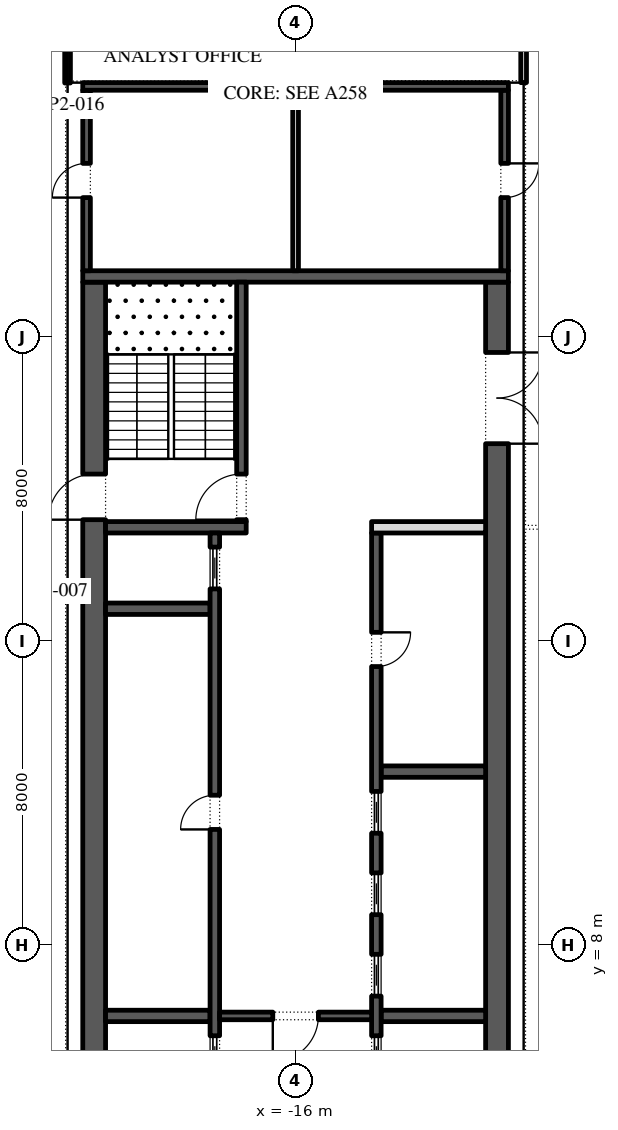
"""IFC4 building model, lengths in metres.
Left out: names, types, materials, properties, quantities, classifications, styles, units other than length and angle.
Written with IfcOpenShell. Run it as: python <this file> out.ifc"""

import sys

from ifc_helpers import new_model, si_unit, direction, frame, frame_2d, origin, place, context, subcontext, project, spatial, rectangle, extrude, element, fill, save


model = new_model("IFC4")
c1 = context("Model", 3, precision=1e-05, world=origin(), true_north=direction((0.0, 1.0)))
c2 = subcontext(c1, "Body", "Model", "MODEL_VIEW")
j1 = project(units=[si_unit("LENGTHUNIT", "METRE"), si_unit("PLANEANGLEUNIT", "RADIAN")], contexts=[c1])
p1 = place(None, origin())
s1 = spatial("IfcSite", under=j1, at=p1, CompositionType="ELEMENT")
p2 = place(p1, origin())
s2 = spatial("IfcBuilding", under=s1, at=p2, CompositionType="ELEMENT")
p3 = place(p2, frame((0.0, 0.0, 255.6)))
s3 = spatial("IfcBuildingStorey", under=s2, at=p3, CompositionType="ELEMENT", Elevation=255.6)
p4 = place(p3, frame((-21.359, 48.678, 0.0), z_axis=(0.0, 0.0, 1.0), x_axis=(-0.224949198343, -0.974370493275, 0.0)))
e1 = element("IfcWall", 1, at=p4, inside=s3, PredefinedType="STANDARD", context=c2, shape_type="SweptSolid", body=[
    extrude(rectangle(XDim=49.5, YDim=0.3, at=frame_2d((24.75, 0.0))), origin(), (0.0, 0.0, 1.0), 4.0),
])
p5 = place(p4, frame((1.157, 0.0, 0.45)))
e2 = element("IfcOpeningElement", 2, at=p5, cuts=e1, PredefinedType="OPENING", context=c2, shape_type="SweptSolid", body=[
    extrude(rectangle(XDim=4.5, YDim=3.05, at=frame_2d((2.25, 1.525))), frame((0.0, 0.16, 0.0), z_axis=(0.0, -1.0, 0.0), x_axis=(1.0, 0.0, 0.0)), (0.0, 0.0, 1.0), 0.32),
])
p6 = place(p4, frame((9.171, 0.0, 0.0)))
e3 = element("IfcOpeningElement", 3, at=p6, cuts=e1, PredefinedType="OPENING", context=c2, shape_type="SweptSolid", body=[
    extrude(rectangle(XDim=2.4, YDim=3.5, at=frame_2d((1.2, 1.75))), frame((0.0, 0.16, 0.0), z_axis=(0.0, -1.0, 0.0), x_axis=(1.0, 0.0, 0.0)), (0.0, 0.0, 1.0), 0.32),
])
p7 = place(p4, frame((15.236, 0.0, 0.45)))
e4 = element("IfcOpeningElement", 4, at=p7, cuts=e1, PredefinedType="OPENING", context=c2, shape_type="SweptSolid", body=[
    extrude(rectangle(XDim=4.5, YDim=3.05, at=frame_2d((2.25, 1.525))), frame((0.0, 0.16, 0.0), z_axis=(0.0, -1.0, 0.0), x_axis=(1.0, 0.0, 0.0)), (0.0, 0.0, 1.0), 0.32),
])
p8 = place(p4, frame((22.35, 0.0, 0.45)))
e5 = element("IfcOpeningElement", 5, at=p8, cuts=e1, PredefinedType="OPENING", context=c2, shape_type="SweptSolid", body=[
    extrude(rectangle(XDim=4.5, YDim=3.05, at=frame_2d((2.25, 1.525))), frame((0.0, 0.16, 0.0), z_axis=(0.0, -1.0, 0.0), x_axis=(1.0, 0.0, 0.0)), (0.0, 0.0, 1.0), 0.32),
])
p9 = place(p4, frame((29.464, 0.0, 0.45)))
e6 = element("IfcOpeningElement", 6, at=p9, cuts=e1, PredefinedType="OPENING", context=c2, shape_type="SweptSolid", body=[
    extrude(rectangle(XDim=4.5, YDim=3.05, at=frame_2d((2.25, 1.525))), frame((0.0, 0.16, 0.0), z_axis=(0.0, -1.0, 0.0), x_axis=(1.0, 0.0, 0.0)), (0.0, 0.0, 1.0), 0.32),
])
p10 = place(p4, frame((37.628, 0.0, 0.0)))
e7 = element("IfcOpeningElement", 7, at=p10, cuts=e1, PredefinedType="OPENING", context=c2, shape_type="SweptSolid", body=[
    extrude(rectangle(XDim=2.4, YDim=3.325, at=frame_2d((1.2, 1.663))), frame((0.0, 0.16, 0.0), z_axis=(0.0, -1.0, 0.0), x_axis=(1.0, 0.0, 0.0)), (0.0, 0.0, 1.0), 0.32),
])
p11 = place(p4, frame((43.693, 0.0, 0.45)))
e8 = element("IfcOpeningElement", 8, at=p11, cuts=e1, PredefinedType="OPENING", context=c2, shape_type="SweptSolid", body=[
    extrude(rectangle(XDim=4.5, YDim=2.825, at=frame_2d((2.25, 1.413))), frame((0.0, 0.16, 0.0), z_axis=(0.0, -1.0, 0.0), x_axis=(1.0, 0.0, 0.0)), (0.0, 0.0, 1.0), 0.32),
])
p12 = place(p3, frame((-21.3, -2.45, 0.0), z_axis=(0.0, 0.0, 1.0), x_axis=(0.0, 1.0, 0.0)))
e9 = element("IfcWall", 9, at=p12, inside=s3, PredefinedType="SHEAR", context=c2, shape_type="SweptSolid", body=[
    extrude(rectangle(XDim=27.9, YDim=0.6, at=frame_2d((13.95, 0.0))), origin(), (0.0, 0.0, 1.0), 4.0),
])
p13 = place(p12, frame((5.05, 0.0, 0.0)))
e10 = element("IfcOpeningElement", 10, at=p13, cuts=e9, PredefinedType="OPENING", context=c2, shape_type="SweptSolid", body=[
    extrude(rectangle(XDim=1.2, YDim=2.1, at=frame_2d((0.6, 1.05))), frame((0.0, 0.31, 0.0), z_axis=(0.0, -1.0, 0.0), x_axis=(1.0, 0.0, 0.0)), (0.0, 0.0, 1.0), 0.62),
])
p14 = place(p12, frame((21.65, 0.0, 0.0)))
e11 = element("IfcOpeningElement", 11, at=p14, cuts=e9, PredefinedType="OPENING", context=c2, shape_type="SweptSolid", body=[
    extrude(rectangle(XDim=1.2, YDim=2.1, at=frame_2d((0.6, 1.05))), frame((0.0, 0.31, 0.0), z_axis=(0.0, -1.0, 0.0), x_axis=(1.0, 0.0, 0.0)), (0.0, 0.0, 1.0), 0.62),
])
p15 = place(p3, frame((-10.7, -2.45, 0.0), z_axis=(0.0, 0.0, 1.0), x_axis=(0.0, 1.0, 0.0)))
e12 = element("IfcWall", 12, at=p15, inside=s3, PredefinedType="SHEAR", context=c2, shape_type="SweptSolid", body=[
    extrude(rectangle(XDim=27.9, YDim=0.6, at=frame_2d((13.95, 0.0))), origin(), (0.0, 0.0, 1.0), 4.0),
])
p16 = place(p15, frame((23.65, 0.0, 0.0)))
e13 = element("IfcOpeningElement", 13, at=p16, cuts=e12, PredefinedType="OPENING", context=c2, shape_type="SweptSolid", body=[
    extrude(rectangle(XDim=2.4, YDim=2.1, at=frame_2d((1.2, 1.05))), frame((0.0, 0.31, 0.0), z_axis=(0.0, -1.0, 0.0), x_axis=(1.0, 0.0, 0.0)), (0.0, 0.0, 1.0), 0.62),
])
p17 = place(p15, frame((1.087, 0.0, 0.0)))
e14 = element("IfcOpeningElement", 14, at=p17, cuts=e12, PredefinedType="OPENING", context=c2, shape_type="SweptSolid", body=[
    extrude(rectangle(XDim=0.9, YDim=2.1, at=frame_2d((0.45, 1.05))), frame((0.0, 0.31, 0.0), z_axis=(0.0, -1.0, 0.0), x_axis=(1.0, 0.0, 0.0)), (0.0, 0.0, 1.0), 0.62),
])
p18 = place(p15, frame((4.262, 0.0, 0.0)))
e15 = element("IfcOpeningElement", 15, at=p18, cuts=e12, PredefinedType="OPENING", context=c2, shape_type="SweptSolid", body=[
    extrude(rectangle(XDim=1.0, YDim=2.1, at=frame_2d((0.5, 1.05))), frame((0.0, 0.31, 0.0), z_axis=(0.0, -1.0, 0.0), x_axis=(1.0, 0.0, 0.0)), (0.0, 0.0, 1.0), 0.62),
])
p19 = place(p3, frame((-21.6, 25.6, 0.0), z_axis=(0.0, 0.0, 1.0), x_axis=(1.0, 0.0, 0.0)))
e16 = element("IfcWall", 16, at=p19, inside=s3, PredefinedType="SHEAR", context=c2, shape_type="SweptSolid", body=[
    extrude(rectangle(XDim=11.2, YDim=0.3, at=frame_2d((5.6, 0.0))), origin(), (0.0, 0.0, 1.0), 4.0),
])
p20 = place(p3, frame((-21.0, 19.0, 0.0), z_axis=(0.0, 0.0, 1.0), x_axis=(1.0, 0.0, 0.0)))
e17 = element("IfcWall", 17, at=p20, inside=s3, PredefinedType="SHEAR", context=c2, shape_type="SweptSolid", body=[
    extrude(rectangle(XDim=3.7, YDim=0.3, at=frame_2d((1.85, 0.0))), origin(), (0.0, 0.0, 1.0), 4.0),
])
p21 = place(p3, frame((-17.425, 19.15, 0.0), z_axis=(0.0, 0.0, 1.0), x_axis=(0.0, 1.0, 0.0)))
e18 = element("IfcWall", 18, at=p21, inside=s3, PredefinedType="SHEAR", context=c2, shape_type="SweptSolid", body=[
    extrude(rectangle(XDim=6.3, YDim=0.25, at=frame_2d((3.15, 0.0))), origin(), (0.0, 0.0, 1.0), 4.0),
])
p22 = place(p21, frame((0.05, 0.0, 0.0)))
e19 = element("IfcOpeningElement", 19, at=p22, cuts=e18, PredefinedType="OPENING", context=c2, shape_type="SweptSolid", body=[
    extrude(rectangle(XDim=1.2, YDim=2.1, at=frame_2d((0.6, 1.05))), frame((0.0, 0.135, 0.0), z_axis=(0.0, -1.0, 0.0), x_axis=(1.0, 0.0, 0.0)), (0.0, 0.0, 1.0), 0.27),
])
for number, where, z_axis, x_axis in (
    (20, (-21.0, 6.143, 0.0), (0.0, 0.0, 1.0), (1.0, 0.0, 0.0)),
    (21, (-21.0, 16.857, 0.0), (0.0, 0.0, 1.0), (1.0, 0.0, 0.0)),
):
    element("IfcWall", number, at=place(p3, frame(where, z_axis=z_axis, x_axis=x_axis)), inside=s3, PredefinedType="SHEAR", context=c2, shape_type="SweptSolid", body=[
        extrude(rectangle(XDim=2.75, YDim=0.3, at=frame_2d((1.375, 0.0))), origin(), (0.0, 0.0, 1.0), 4.0),
    ])
p23 = place(p3, frame((-18.125, 4.15, 0.0), z_axis=(0.0, 0.0, 1.0), x_axis=(0.0, 1.0, 0.0)))
e22 = element("IfcWall", 22, at=p23, inside=s3, PredefinedType="SHEAR", context=c2, shape_type="SweptSolid", body=[
    extrude(rectangle(XDim=14.7, YDim=0.25, at=frame_2d((7.35, 0.0))), origin(), (0.0, 0.0, 1.0), 4.0),
])
p24 = place(p23, frame((6.9, 0.0, 0.0)))
e23 = element("IfcOpeningElement", 23, at=p24, cuts=e22, PredefinedType="OPENING", context=c2, shape_type="SweptSolid", body=[
    extrude(rectangle(XDim=0.9, YDim=2.1, at=frame_2d((0.45, 1.05))), frame((0.0, 0.135, 0.0), z_axis=(0.0, -1.0, 0.0), x_axis=(1.0, 0.0, 0.0)), (0.0, 0.0, 1.0), 0.27),
])
p25 = place(p23, frame((0.371, 0.0, 0.0)))
e24 = element("IfcOpeningElement", 24, at=p25, cuts=e22, PredefinedType="OPENING", context=c2, shape_type="SweptSolid", body=[
    extrude(rectangle(XDim=1.1, YDim=2.1, at=frame_2d((0.55, 1.05))), frame((0.0, 0.135, 0.0), z_axis=(0.0, -1.0, 0.0), x_axis=(1.0, 0.0, 0.0)), (0.0, 0.0, 1.0), 0.27),
])
p26 = place(p23, frame((13.229, 0.0, 0.0)))
e25 = element("IfcOpeningElement", 25, at=p26, cuts=e22, PredefinedType="OPENING", context=c2, shape_type="SweptSolid", body=[
    extrude(rectangle(XDim=1.1, YDim=2.1, at=frame_2d((0.55, 1.05))), frame((0.0, 0.135, 0.0), z_axis=(0.0, -1.0, 0.0), x_axis=(1.0, 0.0, 0.0)), (0.0, 0.0, 1.0), 0.27),
])
for number, where, z_axis, x_axis in (
    (26, (-13.75, 6.143, 0.0), (0.0, 0.0, 1.0), (1.0, 0.0, 0.0)),
    (27, (-13.75, 12.571, 0.0), (0.0, 0.0, 1.0), (1.0, 0.0, 0.0)),
):
    element("IfcWall", number, at=place(p3, frame(where, z_axis=z_axis, x_axis=x_axis)), inside=s3, PredefinedType="SHEAR", context=c2, shape_type="SweptSolid", body=[
        extrude(rectangle(XDim=2.75, YDim=0.3, at=frame_2d((1.375, 0.0))), origin(), (0.0, 0.0, 1.0), 4.0),
    ])
p27 = place(p3, frame((-13.875, -2.45, 0.0), z_axis=(0.0, 0.0, 1.0), x_axis=(0.0, 1.0, 0.0)))
e28 = element("IfcWall", 28, at=p27, inside=s3, PredefinedType="SHEAR", context=c2, shape_type="SweptSolid", body=[
    extrude(rectangle(XDim=21.3, YDim=0.25, at=frame_2d((10.65, 0.0))), origin(), (0.0, 0.0, 1.0), 4.0),
])
p28 = place(p27, frame((17.786, 0.0, 0.0)))
e29 = element("IfcOpeningElement", 29, at=p28, cuts=e28, PredefinedType="OPENING", context=c2, shape_type="SweptSolid", body=[
    extrude(rectangle(XDim=0.9, YDim=2.1, at=frame_2d((0.45, 1.05))), frame((0.0, 0.135, 0.0), z_axis=(0.0, -1.0, 0.0), x_axis=(1.0, 0.0, 0.0)), (0.0, 0.0, 1.0), 0.27),
])
p29 = place(p27, frame((6.971, 0.0, 0.0)))
e30 = element("IfcOpeningElement", 30, at=p29, cuts=e28, PredefinedType="OPENING", context=c2, shape_type="SweptSolid", body=[
    extrude(rectangle(XDim=1.1, YDim=2.1, at=frame_2d((0.55, 1.05))), frame((0.0, 0.135, 0.0), z_axis=(0.0, -1.0, 0.0), x_axis=(1.0, 0.0, 0.0)), (0.0, 0.0, 1.0), 0.27),
])
p30 = place(p27, frame((9.114, 0.0, 0.0)))
e31 = element("IfcOpeningElement", 31, at=p30, cuts=e28, PredefinedType="OPENING", context=c2, shape_type="SweptSolid", body=[
    extrude(rectangle(XDim=1.1, YDim=2.1, at=frame_2d((0.55, 1.05))), frame((0.0, 0.135, 0.0), z_axis=(0.0, -1.0, 0.0), x_axis=(1.0, 0.0, 0.0)), (0.0, 0.0, 1.0), 0.27),
])
p31 = place(p27, frame((11.257, 0.0, 0.0)))
e32 = element("IfcOpeningElement", 32, at=p31, cuts=e28, PredefinedType="OPENING", context=c2, shape_type="SweptSolid", body=[
    extrude(rectangle(XDim=1.1, YDim=2.1, at=frame_2d((0.55, 1.05))), frame((0.0, 0.135, 0.0), z_axis=(0.0, -1.0, 0.0), x_axis=(1.0, 0.0, 0.0)), (0.0, 0.0, 1.0), 0.27),
])
p32 = place(p27, frame((13.4, 0.0, 0.0)))
e33 = element("IfcOpeningElement", 33, at=p32, cuts=e28, PredefinedType="OPENING", context=c2, shape_type="SweptSolid", body=[
    extrude(rectangle(XDim=1.1, YDim=2.1, at=frame_2d((0.55, 1.05))), frame((0.0, 0.135, 0.0), z_axis=(0.0, -1.0, 0.0), x_axis=(1.0, 0.0, 0.0)), (0.0, 0.0, 1.0), 0.27),
])
p33 = place(p3, frame((-14.0, 19.0, 0.0), z_axis=(0.0, 0.0, 1.0), x_axis=(1.0, 0.0, 0.0)))
e34 = element("IfcWall", 34, at=p33, inside=s3, PredefinedType="PARTITIONING", context=c2, shape_type="SweptSolid", body=[
    extrude(rectangle(XDim=3.0, YDim=0.3, at=frame_2d((1.5, 0.0))), origin(), (0.0, 0.0, 1.0), 4.0),
])
p34 = place(p3, frame((-18.0, 6.143, 0.0), z_axis=(0.0, 0.0, 1.0), x_axis=(1.0, 0.0, 0.0)))
e35 = element("IfcWall", 35, at=p34, inside=s3, PredefinedType="SHEAR", context=c2, shape_type="SweptSolid", body=[
    extrude(rectangle(XDim=4.0, YDim=0.2, at=frame_2d((2.0, 0.0))), origin(), (0.0, 0.0, 1.0), 4.0),
])
p35 = place(p34, frame((1.4, 0.0, 0.0)))
e36 = element("IfcOpeningElement", 36, at=p35, cuts=e35, PredefinedType="OPENING", context=c2, shape_type="SweptSolid", body=[
    extrude(rectangle(XDim=1.2, YDim=2.1, at=frame_2d((0.6, 1.05))), frame((0.0, 0.11, 0.0), z_axis=(0.0, -1.0, 0.0), x_axis=(1.0, 0.0, 0.0)), (0.0, 0.0, 1.0), 0.22),
])
p36 = place(p3, frame((-21.5, 25.75, 0.0), z_axis=(0.0, 0.0, 1.0), x_axis=(0.0, 1.0, 0.0)))
e37 = element("IfcWall", 37, at=p36, inside=s3, PredefinedType="SHEAR", context=c2, shape_type="SweptSolid", body=[
    extrude(rectangle(XDim=4.75, YDim=0.2, at=frame_2d((2.375, 0.0))), origin(), (0.0, 0.0, 1.0), 4.0),
])
p37 = place(p36, frame((1.925, 0.0, 0.0)))
e38 = element("IfcOpeningElement", 38, at=p37, cuts=e37, PredefinedType="OPENING", context=c2, shape_type="SweptSolid", body=[
    extrude(rectangle(XDim=0.9, YDim=2.1, at=frame_2d((0.45, 1.05))), frame((0.0, 0.11, 0.0), z_axis=(0.0, -1.0, 0.0), x_axis=(1.0, 0.0, 0.0)), (0.0, 0.0, 1.0), 0.22),
])
p38 = place(p3, frame((-10.5, 25.75, 0.0), z_axis=(0.0, 0.0, 1.0), x_axis=(0.0, 1.0, 0.0)))
e39 = element("IfcWall", 39, at=p38, inside=s3, PredefinedType="SHEAR", context=c2, shape_type="SweptSolid", body=[
    extrude(rectangle(XDim=4.75, YDim=0.2, at=frame_2d((2.375, 0.0))), origin(), (0.0, 0.0, 1.0), 4.0),
])
p39 = place(p38, frame((1.925, 0.0, 0.0)))
e40 = element("IfcOpeningElement", 40, at=p39, cuts=e39, PredefinedType="OPENING", context=c2, shape_type="SweptSolid", body=[
    extrude(rectangle(XDim=0.9, YDim=2.1, at=frame_2d((0.45, 1.05))), frame((0.0, 0.11, 0.0), z_axis=(0.0, -1.0, 0.0), x_axis=(1.0, 0.0, 0.0)), (0.0, 0.0, 1.0), 0.22),
])
p40 = place(p3, frame((-21.6, 30.6, 0.0), z_axis=(0.0, 0.0, 1.0), x_axis=(1.0, 0.0, 0.0)))
e41 = element("IfcWall", 41, at=p40, inside=s3, PredefinedType="SHEAR", context=c2, shape_type="SweptSolid", body=[
    extrude(rectangle(XDim=11.2, YDim=0.2, at=frame_2d((5.6, 0.0))), origin(), (0.0, 0.0, 1.0), 4.0),
])
p41 = place(p3, frame((-16.0, 25.75, 0.0), z_axis=(0.0, 0.0, 1.0), x_axis=(0.0, 1.0, 0.0)))
e42 = element("IfcWall", 42, at=p41, inside=s3, PredefinedType="PARTITIONING", context=c2, shape_type="SweptSolid", body=[
    extrude(rectangle(XDim=4.75, YDim=0.15, at=frame_2d((2.375, 0.0))), origin(), (0.0, 0.0, 1.0), 4.0),
])
p42 = place(p3, frame((-22.0, 32.7, 0.0), z_axis=(0.0, 0.0, 1.0), x_axis=(0.0, -1.0, 0.0)))
e43 = element("IfcWall", 43, at=p42, inside=s3, PredefinedType="PARTITIONING", context=c2, shape_type="SweptSolid", body=[
    extrude(rectangle(XDim=2.01, YDim=0.15, at=frame_2d((1.005, 0.0))), origin(), (0.0, 0.0, 1.0), 4.0),
])
p43 = place(p3, frame((-10.0, 30.7, 0.0), z_axis=(0.0, 0.0, 1.0), x_axis=(0.0, 1.0, 0.0)))
e44 = element("IfcWall", 44, at=p43, inside=s3, PredefinedType="PARTITIONING", context=c2, shape_type="SweptSolid", body=[
    extrude(rectangle(XDim=2.0, YDim=0.15, at=frame_2d((1.0, 0.0))), origin(), (0.0, 0.0, 1.0), 4.0),
])
p44 = place(p24, origin())
e45 = element("IfcDoor", 45, at=p44, inside=s3, OperationType="SINGLE_SWING_RIGHT", PredefinedType="DOOR", context=c2, shape_type="SweptSolid", body=[
    extrude(rectangle(XDim=0.9, YDim=2.1, at=frame_2d((0.45, 1.05))), frame((0.0, 0.125, 0.0), z_axis=(0.0, -1.0, 0.0), x_axis=(1.0, 0.0, 0.0)), (0.0, 0.0, 1.0), 0.05),
])
fill(e23, e45)
p45 = place(p25, origin())
e46 = element("IfcDoor", 46, at=p45, inside=s3, OperationType="SLIDING_TO_LEFT", PredefinedType="DOOR", context=c2, shape_type="SweptSolid", body=[
    extrude(rectangle(XDim=1.1, YDim=2.1, at=frame_2d((0.55, 1.05))), frame((0.0, 0.025, 0.0), z_axis=(0.0, -1.0, 0.0), x_axis=(1.0, 0.0, 0.0)), (0.0, 0.0, 1.0), 0.05),
])
fill(e24, e46)
p46 = place(p26, origin())
e47 = element("IfcDoor", 47, at=p46, inside=s3, OperationType="SLIDING_TO_LEFT", PredefinedType="DOOR", context=c2, shape_type="SweptSolid", body=[
    extrude(rectangle(XDim=1.1, YDim=2.1, at=frame_2d((0.55, 1.05))), frame((0.0, 0.025, 0.0), z_axis=(0.0, -1.0, 0.0), x_axis=(1.0, 0.0, 0.0)), (0.0, 0.0, 1.0), 0.05),
])
fill(e25, e47)
p47 = place(p28, frame((0.9, -0.2, 0.0), z_axis=(0.0, 0.0, 1.0), x_axis=(-1.0, 0.0, 0.0)))
e48 = element("IfcDoor", 48, at=p47, inside=s3, OperationType="SINGLE_SWING_RIGHT", PredefinedType="DOOR", context=c2, shape_type="SweptSolid", body=[
    extrude(rectangle(XDim=0.9, YDim=2.1, at=frame_2d((0.45, 1.05))), frame((0.0, -0.075, 0.0), z_axis=(0.0, -1.0, 0.0), x_axis=(1.0, 0.0, 0.0)), (0.0, 0.0, 1.0), 0.05),
])
fill(e29, e48)
p48 = place(p29, origin())
e49 = element("IfcDoor", 49, at=p48, inside=s3, OperationType="SLIDING_TO_LEFT", PredefinedType="DOOR", context=c2, shape_type="SweptSolid", body=[
    extrude(rectangle(XDim=1.1, YDim=2.1, at=frame_2d((0.55, 1.05))), frame((0.0, 0.025, 0.0), z_axis=(0.0, -1.0, 0.0), x_axis=(1.0, 0.0, 0.0)), (0.0, 0.0, 1.0), 0.05),
])
fill(e30, e49)
p49 = place(p30, origin())
e50 = element("IfcDoor", 50, at=p49, inside=s3, OperationType="SLIDING_TO_LEFT", PredefinedType="DOOR", context=c2, shape_type="SweptSolid", body=[
    extrude(rectangle(XDim=1.1, YDim=2.1, at=frame_2d((0.55, 1.05))), frame((0.0, 0.025, 0.0), z_axis=(0.0, -1.0, 0.0), x_axis=(1.0, 0.0, 0.0)), (0.0, 0.0, 1.0), 0.05),
])
fill(e31, e50)
p50 = place(p31, origin())
e51 = element("IfcDoor", 51, at=p50, inside=s3, OperationType="SLIDING_TO_LEFT", PredefinedType="DOOR", context=c2, shape_type="SweptSolid", body=[
    extrude(rectangle(XDim=1.1, YDim=2.1, at=frame_2d((0.55, 1.05))), frame((0.0, 0.025, 0.0), z_axis=(0.0, -1.0, 0.0), x_axis=(1.0, 0.0, 0.0)), (0.0, 0.0, 1.0), 0.05),
])
fill(e32, e51)
p51 = place(p32, origin())
e52 = element("IfcDoor", 52, at=p51, inside=s3, OperationType="SLIDING_TO_LEFT", PredefinedType="DOOR", context=c2, shape_type="SweptSolid", body=[
    extrude(rectangle(XDim=1.1, YDim=2.1, at=frame_2d((0.55, 1.05))), frame((0.0, 0.025, 0.0), z_axis=(0.0, -1.0, 0.0), x_axis=(1.0, 0.0, 0.0)), (0.0, 0.0, 1.0), 0.05),
])
fill(e33, e52)
p52 = place(p35, frame((1.2, 0.0, 0.0), z_axis=(0.0, 0.0, 1.0), x_axis=(-1.0, 0.0, 0.0)))
e53 = element("IfcDoor", 53, at=p52, inside=s3, OperationType="SINGLE_SWING_LEFT", PredefinedType="DOOR", context=c2, shape_type="SweptSolid", body=[
    extrude(rectangle(XDim=1.2, YDim=2.1, at=frame_2d((0.6, 1.05))), frame((0.0, 0.025, 0.0), z_axis=(0.0, -1.0, 0.0), x_axis=(1.0, 0.0, 0.0)), (0.0, 0.0, 1.0), 0.05),
])
fill(e36, e53)
p53 = place(p16, frame((2.4, 0.0, 0.0), z_axis=(0.0, 0.0, 1.0), x_axis=(-1.0, 0.0, 0.0)))
e54 = element("IfcDoor", 54, at=p53, inside=s3, OperationType="DOUBLE_DOOR_SINGLE_SWING", PredefinedType="DOOR", context=c2, shape_type="SweptSolid", body=[
    extrude(rectangle(XDim=2.4, YDim=2.1, at=frame_2d((1.2, 1.05))), frame((0.0, 0.025, 0.0), z_axis=(0.0, -1.0, 0.0), x_axis=(1.0, 0.0, 0.0)), (0.0, 0.0, 1.0), 0.05),
])
fill(e13, e54)
p54 = place(p22, origin())
e55 = element("IfcDoor", 55, at=p54, inside=s3, OperationType="SINGLE_SWING_RIGHT", PredefinedType="DOOR", context=c2, shape_type="SweptSolid", body=[
    extrude(rectangle(XDim=1.2, YDim=2.1, at=frame_2d((0.6, 1.05))), frame((0.0, 0.025, 0.0), z_axis=(0.0, -1.0, 0.0), x_axis=(1.0, 0.0, 0.0)), (0.0, 0.0, 1.0), 0.05),
])
fill(e19, e55)
p55 = place(p14, origin())
e56 = element("IfcDoor", 56, at=p55, inside=s3, OperationType="SINGLE_SWING_RIGHT", PredefinedType="DOOR", context=c2, shape_type="SweptSolid", body=[
    extrude(rectangle(XDim=1.2, YDim=2.1, at=frame_2d((0.6, 1.05))), frame((0.0, 0.025, 0.0), z_axis=(0.0, -1.0, 0.0), x_axis=(1.0, 0.0, 0.0)), (0.0, 0.0, 1.0), 0.05),
])
fill(e11, e56)
p56 = place(p37, origin())
e57 = element("IfcDoor", 57, at=p56, inside=s3, OperationType="SINGLE_SWING_RIGHT", PredefinedType="DOOR", context=c2, shape_type="SweptSolid", body=[
    extrude(rectangle(XDim=0.9, YDim=2.1, at=frame_2d((0.45, 1.05))), frame((0.0, -0.05, 0.0), z_axis=(0.0, -1.0, 0.0), x_axis=(1.0, 0.0, 0.0)), (0.0, 0.0, 1.0), 0.05),
])
fill(e38, e57)
p57 = place(p39, frame((0.9, 0.15, 0.0), z_axis=(0.0, 0.0, 1.0), x_axis=(-1.0, 0.0, 0.0)))
e58 = element("IfcDoor", 58, at=p57, inside=s3, OperationType="SINGLE_SWING_RIGHT", PredefinedType="DOOR", context=c2, shape_type="SweptSolid", body=[
    extrude(rectangle(XDim=0.9, YDim=2.1, at=frame_2d((0.45, 1.05))), frame((0.0, 0.1, 0.0), z_axis=(0.0, -1.0, 0.0), x_axis=(1.0, 0.0, 0.0)), (0.0, 0.0, 1.0), 0.05),
])
fill(e40, e58)
save(model, sys.argv[1])
